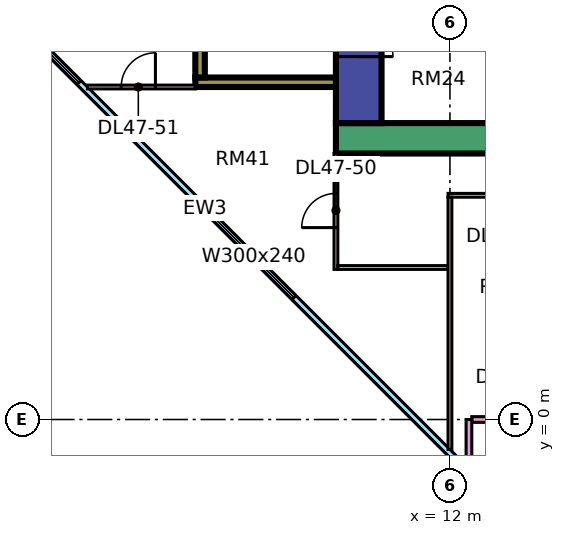
"""IFC4 building model, lengths in metres.
Left out: names, types, materials, properties, quantities, classifications, styles, units other than length and angle.
Written with IfcOpenShell. Run it as: python <this file> out.ifc"""

import sys

from ifc_helpers import new_model, si_unit, direction, frame, frame_2d, origin, place, context, subcontext, project, spatial, rectangle, extrude, element, fill, save


model = new_model("IFC4")
c1 = context("Model", 3, precision=1e-05, world=origin(), true_north=direction((0.0, 1.0)))
c2 = subcontext(c1, "Body", "Model", "MODEL_VIEW")
j1 = project(units=[si_unit("LENGTHUNIT", "METRE"), si_unit("PLANEANGLEUNIT", "RADIAN")], contexts=[c1])
p1 = place(None, origin())
s1 = spatial("IfcSite", under=j1, at=p1, CompositionType="ELEMENT")
p2 = place(p1, origin())
s2 = spatial("IfcBuilding", under=s1, at=p2, CompositionType="ELEMENT")
p3 = place(p2, frame((0.0, 0.0, 202.4)))
s3 = spatial("IfcBuildingStorey", under=s2, at=p3, CompositionType="ELEMENT", Elevation=202.4)
p4 = place(p3, frame((9.0, 7.4, 0.0), z_axis=(0.0, 0.0, 1.0), x_axis=(1.0, 0.0, 0.0)))
e1 = element("IfcWall", 1, at=p4, inside=s3, PredefinedType="SHEAR", context=c2, shape_type="SweptSolid", body=[
    extrude(rectangle(XDim=25.0, YDim=0.8, at=frame_2d((12.5, 0.0))), origin(), (0.0, 0.0, 1.0), 3.75),
])
p5 = place(p3, frame((9.6, 7.8, 0.0), z_axis=(0.0, 0.0, 1.0), x_axis=(0.0, 1.0, 0.0)))
e2 = element("IfcWall", 2, at=p5, inside=s3, PredefinedType="SHEAR", context=c2, shape_type="SweptSolid", body=[
    extrude(rectangle(XDim=11.4, YDim=1.2, at=frame_2d((5.7, 0.0))), origin(), (0.0, 0.0, 1.0), 3.75),
])
p6 = place(p5, frame((4.075, 0.0, 0.0)))
e3 = element("IfcOpeningElement", 3, at=p6, cuts=e2, PredefinedType="OPENING", context=c2, shape_type="SweptSolid", body=[
    extrude(rectangle(XDim=1.1, YDim=2.2, at=frame_2d((0.55, 1.1))), frame((0.0, 0.61, 0.0), z_axis=(0.0, -1.0, 0.0), x_axis=(1.0, 0.0, 0.0)), (0.0, 0.0, 1.0), 1.22),
])
p7 = place(p5, frame((6.575, 0.0, 0.0)))
e4 = element("IfcOpeningElement", 4, at=p7, cuts=e2, PredefinedType="OPENING", context=c2, shape_type="SweptSolid", body=[
    extrude(rectangle(XDim=1.1, YDim=2.2, at=frame_2d((0.55, 1.1))), frame((0.0, 0.61, 0.0), z_axis=(0.0, -1.0, 0.0), x_axis=(1.0, 0.0, 0.0)), (0.0, 0.0, 1.0), 1.22),
])
p8 = place(p5, frame((9.4, 0.0, 0.0)))
e5 = element("IfcOpeningElement", 5, at=p8, cuts=e2, PredefinedType="OPENING", context=c2, shape_type="SweptSolid", body=[
    extrude(rectangle(XDim=1.1, YDim=2.2, at=frame_2d((0.55, 1.1))), frame((0.0, 0.61, 0.0), z_axis=(0.0, -1.0, 0.0), x_axis=(1.0, 0.0, 0.0)), (0.0, 0.0, 1.0), 1.22),
])
p9 = place(p5, frame((1.75, 0.0, 0.0)))
e6 = element("IfcOpeningElement", 6, at=p9, cuts=e2, PredefinedType="OPENING", context=c2, shape_type="SweptSolid", body=[
    extrude(rectangle(XDim=0.9, YDim=2.1, at=frame_2d((0.45, 1.05))), frame((0.0, 0.61, 0.0), z_axis=(0.0, -1.0, 0.0), x_axis=(1.0, 0.0, 0.0)), (0.0, 0.0, 1.0), 1.22),
])
p10 = place(p3, frame((5.3, 8.875, 0.0), z_axis=(0.0, 0.0, 1.0), x_axis=(1.0, 0.0, 0.0)))
e7 = element("IfcWall", 7, at=p10, inside=s3, PredefinedType="SHEAR", context=c2, shape_type="SweptSolid", body=[
    extrude(rectangle(XDim=3.7, YDim=0.25, at=frame_2d((1.85, 0.0))), origin(), (0.0, 0.0, 1.0), 3.75),
])
p11 = place(p3, frame((5.425, 9.0, 0.0), z_axis=(0.0, 0.0, 1.0), x_axis=(0.0, 1.0, 0.0)))
e8 = element("IfcWall", 8, at=p11, inside=s3, PredefinedType="SHEAR", context=c2, shape_type="SweptSolid", body=[
    extrude(rectangle(XDim=4.0, YDim=0.25, at=frame_2d((2.0, 0.0))), origin(), (0.0, 0.0, 1.0), 3.75),
])
p12 = place(p3, frame((-1.447, 12.553, 0.0), z_axis=(0.0, 0.0, 1.0), x_axis=(0.707106781187, -0.707106781187, 0.0)))
e9 = element("IfcWall", 9, at=p12, inside=s3, PredefinedType="SOLIDWALL", context=c2, shape_type="SweptSolid", body=[
    extrude(rectangle(XDim=19.799, YDim=0.15, at=frame_2d((9.899, 0.0))), origin(), (0.0, 0.0, 1.0), 3.3),
])
p13 = place(p12, frame((2.212, 0.0, 0.45)))
e10 = element("IfcOpeningElement", 10, at=p13, cuts=e9, PredefinedType="OPENING", context=c2, shape_type="SweptSolid", body=[
    extrude(rectangle(XDim=3.0, YDim=2.4, at=frame_2d((1.5, 1.2))), frame((0.0, 0.085, 0.0), z_axis=(0.0, -1.0, 0.0), x_axis=(1.0, 0.0, 0.0)), (0.0, 0.0, 1.0), 0.17),
])
p14 = place(p12, frame((10.216, 0.0, 0.45)))
e11 = element("IfcOpeningElement", 11, at=p14, cuts=e9, PredefinedType="OPENING", context=c2, shape_type="SweptSolid", body=[
    extrude(rectangle(XDim=3.0, YDim=2.4, at=frame_2d((1.5, 1.2))), frame((0.0, 0.085, 0.0), z_axis=(0.0, -1.0, 0.0), x_axis=(1.0, 0.0, 0.0)), (0.0, 0.0, 1.0), 0.17),
])
p15 = place(p3, frame((12.575, 0.0, 0.0), z_axis=(0.0, 0.0, 1.0), x_axis=(1.0, 0.0, 0.0)))
e12 = element("IfcWall", 12, at=p15, inside=s3, PredefinedType="SOLIDWALL", context=c2, shape_type="SweptSolid", body=[
    extrude(rectangle(XDim=11.35, YDim=0.15, at=frame_2d((5.675, 0.0))), origin(), (0.0, 0.0, 1.0), 3.3),
])
p16 = place(p15, frame((0.613, 0.0, 0.0)))
e13 = element("IfcOpeningElement", 13, at=p16, cuts=e12, PredefinedType="OPENING", context=c2, shape_type="SweptSolid", body=[
    extrude(rectangle(XDim=1.2, YDim=2.4, at=frame_2d((0.6, 1.2))), frame((0.0, 0.085, 0.0), z_axis=(0.0, -1.0, 0.0), x_axis=(1.0, 0.0, 0.0)), (0.0, 0.0, 1.0), 0.17),
])
p17 = place(p15, frame((5.15, 0.0, 0.45)))
e14 = element("IfcOpeningElement", 14, at=p17, cuts=e12, PredefinedType="OPENING", context=c2, shape_type="SweptSolid", body=[
    extrude(rectangle(XDim=3.0, YDim=2.4, at=frame_2d((1.5, 1.2))), frame((0.0, 0.085, 0.0), z_axis=(0.0, -1.0, 0.0), x_axis=(1.0, 0.0, 0.0)), (0.0, 0.0, 1.0), 0.17),
])
p18 = place(p3, frame((12.5, -1.5, 0.0), z_axis=(0.0, 0.0, 1.0), x_axis=(0.0, 1.0, 0.0)))
e15 = element("IfcWall", 15, at=p18, inside=s3, PredefinedType="SOLIDWALL", context=c2, shape_type="SweptSolid", body=[
    extrude(rectangle(XDim=1.5, YDim=0.15, at=frame_2d((0.75, 0.0))), origin(), (0.0, 0.0, 1.0), 3.3),
])
p19 = place(p3, frame((2.461, 8.75, 0.0), z_axis=(0.0, 0.0, 1.0), x_axis=(1.0, 0.0, 0.0)))
e16 = element("IfcWall", 16, at=p19, inside=s3, PredefinedType="PARTITIONING", context=c2, shape_type="SweptSolid", body=[
    extrude(rectangle(XDim=2.839, YDim=0.1, at=frame_2d((1.419, 0.0))), origin(), (0.0, 0.0, 1.0), 3.3),
])
p20 = place(p19, frame((0.889, 0.0, 0.0)))
e17 = element("IfcOpeningElement", 17, at=p20, cuts=e16, PredefinedType="OPENING", context=c2, shape_type="SweptSolid", body=[
    extrude(rectangle(XDim=0.9, YDim=2.1, at=frame_2d((0.45, 1.05))), frame((0.0, 0.06, 0.0), z_axis=(0.0, -1.0, 0.0), x_axis=(1.0, 0.0, 0.0)), (0.0, 0.0, 1.0), 0.12),
])
p21 = place(p3, frame((9.0, 3.95, 0.0), z_axis=(0.0, 0.0, 1.0), x_axis=(0.0, 1.0, 0.0)))
e18 = element("IfcWall", 18, at=p21, inside=s3, PredefinedType="PARTITIONING", context=c2, shape_type="SweptSolid", body=[
    extrude(rectangle(XDim=3.05, YDim=0.1, at=frame_2d((1.525, 0.0))), origin(), (0.0, 0.0, 1.0), 3.3),
])
p22 = place(p21, frame((1.1, 0.0, 0.0)))
e19 = element("IfcOpeningElement", 19, at=p22, cuts=e18, PredefinedType="OPENING", context=c2, shape_type="SweptSolid", body=[
    extrude(rectangle(XDim=0.9, YDim=2.1, at=frame_2d((0.45, 1.05))), frame((0.0, 0.06, 0.0), z_axis=(0.0, -1.0, 0.0), x_axis=(1.0, 0.0, 0.0)), (0.0, 0.0, 1.0), 0.12),
])
p23 = place(p3, frame((9.05, 4.0, 0.0), z_axis=(0.0, 0.0, 1.0), x_axis=(1.0, 0.0, 0.0)))
e20 = element("IfcWall", 20, at=p23, inside=s3, PredefinedType="PARTITIONING", context=c2, shape_type="SweptSolid", body=[
    extrude(rectangle(XDim=2.9, YDim=0.1, at=frame_2d((1.45, 0.0))), origin(), (0.0, 0.0, 1.0), 3.3),
])
p24 = place(p3, frame((11.95, 5.9, 0.0), z_axis=(0.0, 0.0, 1.0), x_axis=(1.0, 0.0, 0.0)))
e21 = element("IfcWall", 21, at=p24, inside=s3, PredefinedType="PARTITIONING", context=c2, shape_type="SweptSolid", body=[
    extrude(rectangle(XDim=21.1, YDim=0.1, at=frame_2d((10.55, 0.0))), origin(), (0.0, 0.0, 1.0), 3.3),
])
p25 = place(p24, frame((1.1, 0.0, 0.0)))
e22 = element("IfcOpeningElement", 22, at=p25, cuts=e21, PredefinedType="OPENING", context=c2, shape_type="SweptSolid", body=[
    extrude(rectangle(XDim=0.9, YDim=2.1, at=frame_2d((0.45, 1.05))), frame((0.0, 0.06, 0.0), z_axis=(0.0, -1.0, 0.0), x_axis=(1.0, 0.0, 0.0)), (0.0, 0.0, 1.0), 0.12),
])
p26 = place(p24, frame((13.1, 0.0, 0.0)))
e23 = element("IfcOpeningElement", 23, at=p26, cuts=e21, PredefinedType="OPENING", context=c2, shape_type="SweptSolid", body=[
    extrude(rectangle(XDim=0.9, YDim=2.1, at=frame_2d((0.45, 1.05))), frame((0.0, 0.06, 0.0), z_axis=(0.0, -1.0, 0.0), x_axis=(1.0, 0.0, 0.0)), (0.0, 0.0, 1.0), 0.12),
])
p27 = place(p24, frame((16.1, 0.0, 0.0)))
e24 = element("IfcOpeningElement", 24, at=p27, cuts=e21, PredefinedType="OPENING", context=c2, shape_type="SweptSolid", body=[
    extrude(rectangle(XDim=0.9, YDim=2.1, at=frame_2d((0.45, 1.05))), frame((0.0, 0.06, 0.0), z_axis=(0.0, -1.0, 0.0), x_axis=(1.0, 0.0, 0.0)), (0.0, 0.0, 1.0), 0.12),
])
p28 = place(p24, frame((7.1, 0.0, 0.0)))
e25 = element("IfcOpeningElement", 25, at=p28, cuts=e21, PredefinedType="OPENING", context=c2, shape_type="SweptSolid", body=[
    extrude(rectangle(XDim=0.9, YDim=2.1, at=frame_2d((0.45, 1.05))), frame((0.0, 0.06, 0.0), z_axis=(0.0, -1.0, 0.0), x_axis=(1.0, 0.0, 0.0)), (0.0, 0.0, 1.0), 0.12),
])
p29 = place(p3, frame((12.0, -0.788, 0.0), z_axis=(0.0, 0.0, 1.0), x_axis=(0.0, 1.0, 0.0)))
e26 = element("IfcWall", 26, at=p29, inside=s3, PredefinedType="PARTITIONING", context=c2, shape_type="SweptSolid", body=[
    extrude(rectangle(XDim=6.638, YDim=0.1, at=frame_2d((3.319, 0.0))), origin(), (0.0, 0.0, 1.0), 3.3),
])
p30 = place(p13, origin())
e27 = element("IfcWindow", 27, at=p30, inside=s3, PartitioningType="SINGLE_PANEL", PredefinedType="WINDOW", context=c2, shape_type="SweptSolid", body=[
    extrude(rectangle(XDim=3.0, YDim=2.4, at=frame_2d((1.5, 1.2))), frame((0.0, 0.03, 0.0), z_axis=(0.0, -1.0, 0.0), x_axis=(1.0, 0.0, 0.0)), (0.0, 0.0, 1.0), 0.06),
])
fill(e10, e27)
p31 = place(p14, origin())
e28 = element("IfcWindow", 28, at=p31, inside=s3, PartitioningType="SINGLE_PANEL", PredefinedType="WINDOW", context=c2, shape_type="SweptSolid", body=[
    extrude(rectangle(XDim=3.0, YDim=2.4, at=frame_2d((1.5, 1.2))), frame((0.0, 0.03, 0.0), z_axis=(0.0, -1.0, 0.0), x_axis=(1.0, 0.0, 0.0)), (0.0, 0.0, 1.0), 0.06),
])
fill(e11, e28)
p32 = place(p9, frame((0.9, 0.0, 0.0), z_axis=(0.0, 0.0, 1.0), x_axis=(-1.0, 0.0, 0.0)))
e29 = element("IfcDoor", 29, at=p32, inside=s3, OperationType="SINGLE_SWING_LEFT", PredefinedType="DOOR", context=c2, shape_type="SweptSolid", body=[
    extrude(rectangle(XDim=0.9, YDim=2.1, at=frame_2d((0.45, 1.05))), frame((0.0, 0.025, 0.0), z_axis=(0.0, -1.0, 0.0), x_axis=(1.0, 0.0, 0.0)), (0.0, 0.0, 1.0), 0.05),
])
fill(e6, e29)
p33 = place(p22, origin())
e30 = element("IfcDoor", 30, at=p33, inside=s3, OperationType="SINGLE_SWING_LEFT", PredefinedType="DOOR", context=c2, shape_type="SweptSolid", body=[
    extrude(rectangle(XDim=0.9, YDim=2.1, at=frame_2d((0.45, 1.05))), frame((0.0, 0.025, 0.0), z_axis=(0.0, -1.0, 0.0), x_axis=(1.0, 0.0, 0.0)), (0.0, 0.0, 1.0), 0.05),
])
fill(e19, e30)
p34 = place(p20, frame((0.9, 0.0, 0.0), z_axis=(0.0, 0.0, 1.0), x_axis=(-1.0, 0.0, 0.0)))
e31 = element("IfcDoor", 31, at=p34, inside=s3, OperationType="SINGLE_SWING_RIGHT", PredefinedType="DOOR", context=c2, shape_type="SweptSolid", body=[
    extrude(rectangle(XDim=0.9, YDim=2.1, at=frame_2d((0.45, 1.05))), frame((0.0, 0.025, 0.0), z_axis=(0.0, -1.0, 0.0), x_axis=(1.0, 0.0, 0.0)), (0.0, 0.0, 1.0), 0.05),
])
fill(e17, e31)
save(model, sys.argv[1])
